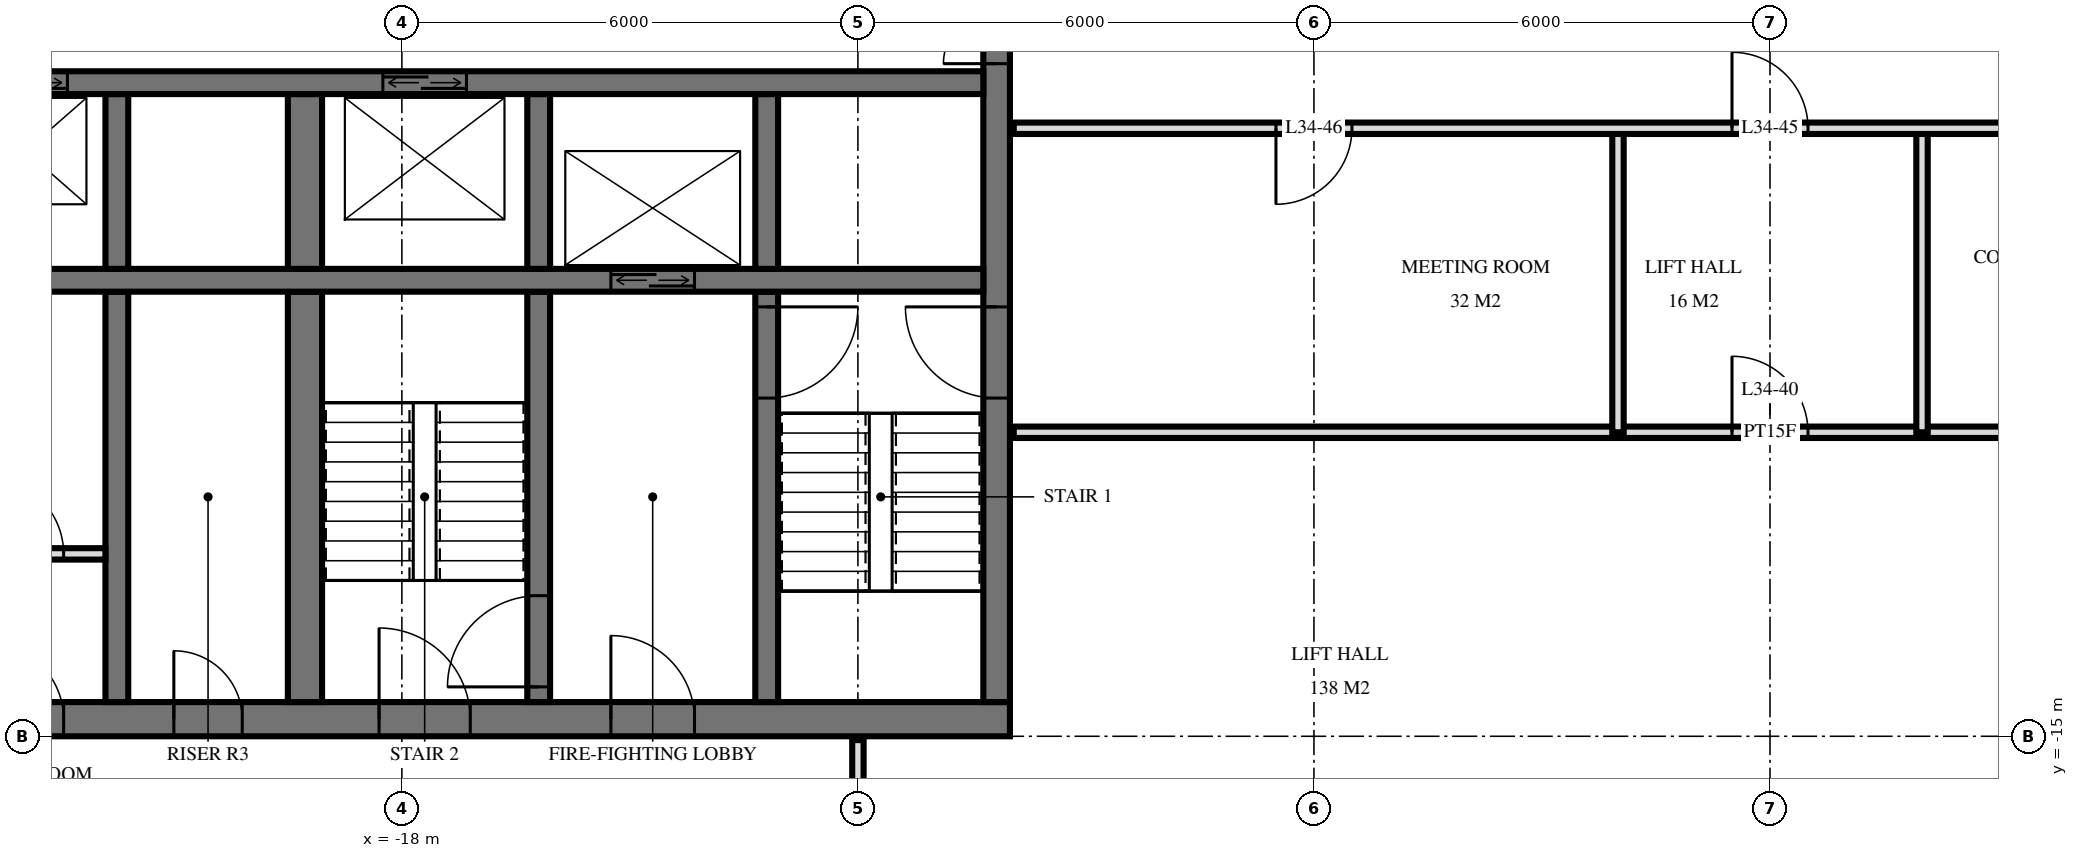
"""IFC4 building model, lengths in metres.
Left out: names, types, materials, properties, quantities, classifications, styles, units other than length and angle.
Written with IfcOpenShell. Run it as: python <this file> out.ifc"""

import sys

from ifc_helpers import new_model, si_unit, direction, frame, frame_2d, origin, place, context, subcontext, project, spatial, rectangle, extrude, element, fill, save


model = new_model("IFC4")
c1 = context("Model", 3, precision=1e-05, world=origin(), true_north=direction((0.0, 1.0)))
c2 = subcontext(c1, "Body", "Model", "MODEL_VIEW")
j1 = project(units=[si_unit("LENGTHUNIT", "METRE"), si_unit("PLANEANGLEUNIT", "RADIAN")], contexts=[c1])
p1 = place(None, origin())
s1 = spatial("IfcSite", under=j1, at=p1, CompositionType="ELEMENT")
p2 = place(p1, origin())
s2 = spatial("IfcBuilding", under=s1, at=p2, CompositionType="ELEMENT")
p3 = place(p2, frame((0.0, 0.0, 134.4)))
s3 = spatial("IfcBuildingStorey", under=s2, at=p3, CompositionType="ELEMENT", Elevation=134.4)
p4 = place(p3, frame((-24.5, -14.775, 0.0), z_axis=(0.0, 0.0, 1.0), x_axis=(1.0, 0.0, 0.0)))
e1 = element("IfcWall", 1, at=p4, inside=s3, PredefinedType="SHEAR", context=c2, shape_type="SweptSolid", body=[
    extrude(rectangle(XDim=14.5, YDim=0.45, at=frame_2d((7.25, 0.0))), origin(), (0.0, 0.0, 1.0), 3.6),
])
p5 = place(p4, frame((6.2, 0.0, 0.0)))
e2 = element("IfcOpeningElement", 2, at=p5, cuts=e1, PredefinedType="OPENING", context=c2, shape_type="SweptSolid", body=[
    extrude(rectangle(XDim=1.2, YDim=2.1, at=frame_2d((0.6, 1.05))), frame((0.0, 0.235, 0.0), z_axis=(0.0, -1.0, 0.0), x_axis=(1.0, 0.0, 0.0)), (0.0, 0.0, 1.0), 0.47),
])
p6 = place(p4, frame((9.25, 0.0, 0.0)))
e3 = element("IfcOpeningElement", 3, at=p6, cuts=e1, PredefinedType="OPENING", context=c2, shape_type="SweptSolid", body=[
    extrude(rectangle(XDim=1.1, YDim=2.1, at=frame_2d((0.55, 1.05))), frame((0.0, 0.235, 0.0), z_axis=(0.0, -1.0, 0.0), x_axis=(1.0, 0.0, 0.0)), (0.0, 0.0, 1.0), 0.47),
])
p7 = place(p4, frame((3.5, 0.0, 0.0)))
e4 = element("IfcOpeningElement", 4, at=p7, cuts=e1, PredefinedType="OPENING", context=c2, shape_type="SweptSolid", body=[
    extrude(rectangle(XDim=0.9, YDim=2.1, at=frame_2d((0.45, 1.05))), frame((0.0, 0.235, 0.0), z_axis=(0.0, -1.0, 0.0), x_axis=(1.0, 0.0, 0.0)), (0.0, 0.0, 1.0), 0.47),
])
p8 = place(p4, frame((1.05, 0.0, 0.0)))
e5 = element("IfcOpeningElement", 5, at=p8, cuts=e1, PredefinedType="OPENING", context=c2, shape_type="SweptSolid", body=[
    extrude(rectangle(XDim=1.0, YDim=2.1, at=frame_2d((0.5, 1.05))), frame((0.0, 0.235, 0.0), z_axis=(0.0, -1.0, 0.0), x_axis=(1.0, 0.0, 0.0)), (0.0, 0.0, 1.0), 0.47),
])
p9 = place(p3, frame((-10.175, -14.55, 0.0), z_axis=(0.0, 0.0, 1.0), x_axis=(0.0, 1.0, 0.0)))
e6 = element("IfcWall", 6, at=p9, inside=s3, PredefinedType="SHEAR", context=c2, shape_type="SweptSolid", body=[
    extrude(rectangle(XDim=14.1, YDim=0.35, at=frame_2d((7.05, 0.0))), origin(), (0.0, 0.0, 1.0), 3.6),
])
p10 = place(p9, frame((8.4, 0.0, 0.0)))
e7 = element("IfcOpeningElement", 7, at=p10, cuts=e6, PredefinedType="OPENING", context=c2, shape_type="SweptSolid", body=[
    extrude(rectangle(XDim=1.4, YDim=2.4, at=frame_2d((0.7, 1.2))), frame((0.0, 0.185, 0.0), z_axis=(0.0, -1.0, 0.0), x_axis=(1.0, 0.0, 0.0)), (0.0, 0.0, 1.0), 0.37),
])
p11 = place(p9, frame((10.0, 0.0, 0.0)))
e8 = element("IfcOpeningElement", 8, at=p11, cuts=e6, PredefinedType="OPENING", context=c2, shape_type="SweptSolid", body=[
    extrude(rectangle(XDim=1.4, YDim=2.4, at=frame_2d((0.7, 1.2))), frame((0.0, 0.185, 0.0), z_axis=(0.0, -1.0, 0.0), x_axis=(1.0, 0.0, 0.0)), (0.0, 0.0, 1.0), 0.37),
])
p12 = place(p9, frame((4.0, 0.0, 0.0)))
e9 = element("IfcOpeningElement", 9, at=p12, cuts=e6, PredefinedType="OPENING", context=c2, shape_type="SweptSolid", body=[
    extrude(rectangle(XDim=1.2, YDim=2.1, at=frame_2d((0.6, 1.05))), frame((0.0, 0.185, 0.0), z_axis=(0.0, -1.0, 0.0), x_axis=(1.0, 0.0, 0.0)), (0.0, 0.0, 1.0), 0.37),
])
p13 = place(p3, frame((-24.05, -6.4, 0.0), z_axis=(0.0, 0.0, 1.0), x_axis=(1.0, 0.0, 0.0)))
e10 = element("IfcWall", 10, at=p13, inside=s3, PredefinedType="SHEAR", context=c2, shape_type="SweptSolid", body=[
    extrude(rectangle(XDim=13.7, YDim=0.3, at=frame_2d((6.85, 0.0))), origin(), (0.0, 0.0, 1.0), 3.6),
])
p14 = place(p13, frame((0.55, 0.0, 0.0)))
e11 = element("IfcOpeningElement", 11, at=p14, cuts=e10, PredefinedType="OPENING", context=c2, shape_type="SweptSolid", body=[
    extrude(rectangle(XDim=1.1, YDim=2.1, at=frame_2d((0.55, 1.05))), frame((0.0, 0.16, 0.0), z_axis=(0.0, -1.0, 0.0), x_axis=(1.0, 0.0, 0.0)), (0.0, 0.0, 1.0), 0.32),
])
p15 = place(p13, frame((5.8, 0.0, 0.0)))
e12 = element("IfcOpeningElement", 12, at=p15, cuts=e10, PredefinedType="OPENING", context=c2, shape_type="SweptSolid", body=[
    extrude(rectangle(XDim=1.1, YDim=2.1, at=frame_2d((0.55, 1.05))), frame((0.0, 0.16, 0.0), z_axis=(0.0, -1.0, 0.0), x_axis=(1.0, 0.0, 0.0)), (0.0, 0.0, 1.0), 0.32),
])
p16 = place(p3, frame((-24.05, -9.0, 0.0), z_axis=(0.0, 0.0, 1.0), x_axis=(1.0, 0.0, 0.0)))
e13 = element("IfcWall", 13, at=p16, inside=s3, PredefinedType="SHEAR", context=c2, shape_type="SweptSolid", body=[
    extrude(rectangle(XDim=13.7, YDim=0.3, at=frame_2d((6.85, 0.0))), origin(), (0.0, 0.0, 1.0), 3.6),
])
p17 = place(p16, frame((8.8, 0.0, 0.0)))
e14 = element("IfcOpeningElement", 14, at=p17, cuts=e13, PredefinedType="OPENING", context=c2, shape_type="SweptSolid", body=[
    extrude(rectangle(XDim=1.1, YDim=2.1, at=frame_2d((0.55, 1.05))), frame((0.0, 0.16, 0.0), z_axis=(0.0, -1.0, 0.0), x_axis=(1.0, 0.0, 0.0)), (0.0, 0.0, 1.0), 0.32),
])
p18 = place(p3, frame((-13.2, -8.85, 0.0), z_axis=(0.0, 0.0, 1.0), x_axis=(0.0, 1.0, 0.0)))
e15 = element("IfcWall", 15, at=p18, inside=s3, PredefinedType="SHEAR", context=c2, shape_type="SweptSolid", body=[
    extrude(rectangle(XDim=2.3, YDim=0.3, at=frame_2d((1.15, 0.0))), origin(), (0.0, 0.0, 1.0), 3.6),
])
p19 = place(p3, frame((-13.2, -14.55, 0.0), z_axis=(0.0, 0.0, 1.0), x_axis=(0.0, 1.0, 0.0)))
e16 = element("IfcWall", 16, at=p19, inside=s3, PredefinedType="SHEAR", context=c2, shape_type="SweptSolid", body=[
    extrude(rectangle(XDim=5.4, YDim=0.3, at=frame_2d((2.7, 0.0))), origin(), (0.0, 0.0, 1.0), 3.6),
])
p20 = place(p19, frame((4.0, 0.0, 0.0)))
e17 = element("IfcOpeningElement", 17, at=p20, cuts=e16, PredefinedType="OPENING", context=c2, shape_type="SweptSolid", body=[
    extrude(rectangle(XDim=1.2, YDim=2.1, at=frame_2d((0.6, 1.05))), frame((0.0, 0.16, 0.0), z_axis=(0.0, -1.0, 0.0), x_axis=(1.0, 0.0, 0.0)), (0.0, 0.0, 1.0), 0.32),
])
p21 = place(p3, frame((-16.2, -8.85, 0.0), z_axis=(0.0, 0.0, 1.0), x_axis=(0.0, 1.0, 0.0)))
e18 = element("IfcWall", 18, at=p21, inside=s3, PredefinedType="SHEAR", context=c2, shape_type="SweptSolid", body=[
    extrude(rectangle(XDim=2.3, YDim=0.3, at=frame_2d((1.15, 0.0))), origin(), (0.0, 0.0, 1.0), 3.6),
])
p22 = place(p3, frame((-16.2, -14.55, 0.0), z_axis=(0.0, 0.0, 1.0), x_axis=(0.0, 1.0, 0.0)))
e19 = element("IfcWall", 19, at=p22, inside=s3, PredefinedType="SHEAR", context=c2, shape_type="SweptSolid", body=[
    extrude(rectangle(XDim=5.4, YDim=0.3, at=frame_2d((2.7, 0.0))), origin(), (0.0, 0.0, 1.0), 3.6),
])
p23 = place(p22, frame((0.2, 0.0, 0.0)))
e20 = element("IfcOpeningElement", 20, at=p23, cuts=e19, PredefinedType="OPENING", context=c2, shape_type="SweptSolid", body=[
    extrude(rectangle(XDim=1.2, YDim=2.1, at=frame_2d((0.6, 1.05))), frame((0.0, 0.16, 0.0), z_axis=(0.0, -1.0, 0.0), x_axis=(1.0, 0.0, 0.0)), (0.0, 0.0, 1.0), 0.32),
])
p24 = place(p3, frame((-19.275, -8.85, 0.0), z_axis=(0.0, 0.0, 1.0), x_axis=(0.0, 1.0, 0.0)))
e21 = element("IfcWall", 21, at=p24, inside=s3, PredefinedType="SHEAR", context=c2, shape_type="SweptSolid", body=[
    extrude(rectangle(XDim=2.3, YDim=0.45, at=frame_2d((1.15, 0.0))), origin(), (0.0, 0.0, 1.0), 3.6),
])
p25 = place(p3, frame((-19.275, -14.55, 0.0), z_axis=(0.0, 0.0, 1.0), x_axis=(0.0, 1.0, 0.0)))
e22 = element("IfcWall", 22, at=p25, inside=s3, PredefinedType="SHEAR", context=c2, shape_type="SweptSolid", body=[
    extrude(rectangle(XDim=5.4, YDim=0.45, at=frame_2d((2.7, 0.0))), origin(), (0.0, 0.0, 1.0), 3.6),
])
p26 = place(p3, frame((-21.75, -8.85, 0.0), z_axis=(0.0, 0.0, 1.0), x_axis=(0.0, 1.0, 0.0)))
e23 = element("IfcWall", 23, at=p26, inside=s3, PredefinedType="SHEAR", context=c2, shape_type="SweptSolid", body=[
    extrude(rectangle(XDim=2.3, YDim=0.3, at=frame_2d((1.15, 0.0))), origin(), (0.0, 0.0, 1.0), 3.6),
])
p27 = place(p3, frame((-21.75, -14.55, 0.0), z_axis=(0.0, 0.0, 1.0), x_axis=(0.0, 1.0, 0.0)))
e24 = element("IfcWall", 24, at=p27, inside=s3, PredefinedType="SHEAR", context=c2, shape_type="SweptSolid", body=[
    extrude(rectangle(XDim=5.4, YDim=0.3, at=frame_2d((2.7, 0.0))), origin(), (0.0, 0.0, 1.0), 3.6),
])
p28 = place(p3, frame((-24.0, -12.6, 0.0), z_axis=(0.0, 0.0, 1.0), x_axis=(1.0, 0.0, 0.0)))
e25 = element("IfcWall", 25, at=p28, inside=s3, PredefinedType="PARTITIONING", context=c2, shape_type="SweptSolid", body=[
    extrude(rectangle(XDim=2.1, YDim=0.15, at=frame_2d((1.05, 0.0))), origin(), (0.0, 0.0, 1.0), 3.3),
])
p29 = place(p28, frame((0.55, 0.0, 0.0)))
e26 = element("IfcOpeningElement", 26, at=p29, cuts=e25, PredefinedType="OPENING", context=c2, shape_type="SweptSolid", body=[
    extrude(rectangle(XDim=1.0, YDim=2.1, at=frame_2d((0.5, 1.05))), frame((0.0, 0.085, 0.0), z_axis=(0.0, -1.0, 0.0), x_axis=(1.0, 0.0, 0.0)), (0.0, 0.0, 1.0), 0.17),
])
for number, where, z_axis, x_axis in (
    (27, (2.0, -11.0, 0.0), (0.0, 0.0, 1.0), (0.0, 1.0, 0.0)),
    (28, (-2.0, -11.0, 0.0), (0.0, 0.0, 1.0), (0.0, 1.0, 0.0)),
):
    element("IfcWall", number, at=place(p3, frame(where, z_axis=z_axis, x_axis=x_axis)), inside=s3, PredefinedType="PARTITIONING", context=c2, shape_type="SweptSolid", body=[
        extrude(rectangle(XDim=4.0, YDim=0.15, at=frame_2d((2.0, 0.0))), origin(), (0.0, 0.0, 1.0), 3.32),
    ])
p30 = place(p3, frame((-12.0, -17.4, 0.0), z_axis=(0.0, 0.0, 1.0), x_axis=(0.0, 1.0, 0.0)))
e29 = element("IfcWall", 29, at=p30, inside=s3, PredefinedType="PARTITIONING", context=c2, shape_type="SweptSolid", body=[
    extrude(rectangle(XDim=2.35, YDim=0.15, at=frame_2d((1.175, 0.0))), origin(), (0.0, 0.0, 1.0), 3.32),
])
p31 = place(p30, frame((0.7, 0.0, 0.0)))
e30 = element("IfcOpeningElement", 30, at=p31, cuts=e29, PredefinedType="OPENING", context=c2, shape_type="SweptSolid", body=[
    extrude(rectangle(XDim=1.0, YDim=2.1, at=frame_2d((0.5, 1.05))), frame((0.0, 0.085, 0.0), z_axis=(0.0, -1.0, 0.0), x_axis=(1.0, 0.0, 0.0)), (0.0, 0.0, 1.0), 0.17),
])
p32 = place(p3, frame((-9.95, -11.0, 0.0), z_axis=(0.0, 0.0, 1.0), x_axis=(1.0, 0.0, 0.0)))
e31 = element("IfcWall", 31, at=p32, inside=s3, PredefinedType="PARTITIONING", context=c2, shape_type="SweptSolid", body=[
    extrude(rectangle(XDim=19.9, YDim=0.15, at=frame_2d((9.95, 0.0))), origin(), (0.0, 0.0, 1.0), 3.32),
])
p33 = place(p32, frame((9.45, 0.0, 0.0)))
e32 = element("IfcOpeningElement", 32, at=p33, cuts=e31, PredefinedType="OPENING", context=c2, shape_type="SweptSolid", body=[
    extrude(rectangle(XDim=1.0, YDim=2.1, at=frame_2d((0.5, 1.05))), frame((0.0, 0.085, 0.0), z_axis=(0.0, -1.0, 0.0), x_axis=(1.0, 0.0, 0.0)), (0.0, 0.0, 1.0), 0.17),
])
p34 = place(p32, frame((15.45, 0.0, 0.0)))
e33 = element("IfcOpeningElement", 33, at=p34, cuts=e31, PredefinedType="OPENING", context=c2, shape_type="SweptSolid", body=[
    extrude(rectangle(XDim=1.0, YDim=2.1, at=frame_2d((0.5, 1.05))), frame((0.0, 0.085, 0.0), z_axis=(0.0, -1.0, 0.0), x_axis=(1.0, 0.0, 0.0)), (0.0, 0.0, 1.0), 0.17),
])
p35 = place(p3, frame((-9.95, -7.0, 0.0), z_axis=(0.0, 0.0, 1.0), x_axis=(1.0, 0.0, 0.0)))
e34 = element("IfcWall", 34, at=p35, inside=s3, PredefinedType="PARTITIONING", context=c2, shape_type="SweptSolid", body=[
    extrude(rectangle(XDim=19.9, YDim=0.15, at=frame_2d((9.95, 0.0))), origin(), (0.0, 0.0, 1.0), 3.32),
])
p36 = place(p35, frame((9.45, 0.0, 0.0)))
e35 = element("IfcOpeningElement", 35, at=p36, cuts=e34, PredefinedType="OPENING", context=c2, shape_type="SweptSolid", body=[
    extrude(rectangle(XDim=1.0, YDim=2.1, at=frame_2d((0.5, 1.05))), frame((0.0, 0.085, 0.0), z_axis=(0.0, -1.0, 0.0), x_axis=(1.0, 0.0, 0.0)), (0.0, 0.0, 1.0), 0.17),
])
p37 = place(p35, frame((3.45, 0.0, 0.0)))
e36 = element("IfcOpeningElement", 36, at=p37, cuts=e34, PredefinedType="OPENING", context=c2, shape_type="SweptSolid", body=[
    extrude(rectangle(XDim=1.0, YDim=2.1, at=frame_2d((0.5, 1.05))), frame((0.0, 0.085, 0.0), z_axis=(0.0, -1.0, 0.0), x_axis=(1.0, 0.0, 0.0)), (0.0, 0.0, 1.0), 0.17),
])
p38 = place(p14, origin())
e37 = element("IfcDoor", 37, at=p38, inside=s3, OperationType="DOUBLE_DOOR_SLIDING", PredefinedType="USERDEFINED", context=c2, shape_type="SweptSolid", body=[
    extrude(rectangle(XDim=1.1, YDim=2.1, at=frame_2d((0.55, 1.05))), frame((0.0, 0.025, 0.0), z_axis=(0.0, -1.0, 0.0), x_axis=(1.0, 0.0, 0.0)), (0.0, 0.0, 1.0), 0.05),
])
fill(e11, e37)
p39 = place(p17, origin())
e38 = element("IfcDoor", 38, at=p39, inside=s3, OperationType="DOUBLE_DOOR_SLIDING", PredefinedType="USERDEFINED", context=c2, shape_type="SweptSolid", body=[
    extrude(rectangle(XDim=1.1, YDim=2.1, at=frame_2d((0.55, 1.05))), frame((0.0, 0.025, 0.0), z_axis=(0.0, -1.0, 0.0), x_axis=(1.0, 0.0, 0.0)), (0.0, 0.0, 1.0), 0.05),
])
fill(e14, e38)
p40 = place(p15, origin())
e39 = element("IfcDoor", 39, at=p40, inside=s3, OperationType="DOUBLE_DOOR_SLIDING", PredefinedType="USERDEFINED", context=c2, shape_type="SweptSolid", body=[
    extrude(rectangle(XDim=1.1, YDim=2.1, at=frame_2d((0.55, 1.05))), frame((0.0, 0.025, 0.0), z_axis=(0.0, -1.0, 0.0), x_axis=(1.0, 0.0, 0.0)), (0.0, 0.0, 1.0), 0.05),
])
fill(e12, e39)
p41 = place(p10, origin())
e40 = element("IfcDoor", 40, at=p41, inside=s3, OperationType="DOUBLE_DOOR_SINGLE_SWING", PredefinedType="DOOR", context=c2, shape_type="SweptSolid", body=[
    extrude(rectangle(XDim=1.4, YDim=2.4, at=frame_2d((0.7, 1.2))), frame((0.0, 0.025, 0.0), z_axis=(0.0, -1.0, 0.0), x_axis=(1.0, 0.0, 0.0)), (0.0, 0.0, 1.0), 0.05),
])
fill(e7, e40)
p42 = place(p12, origin())
e41 = element("IfcDoor", 41, at=p42, inside=s3, OperationType="SINGLE_SWING_LEFT", PredefinedType="DOOR", context=c2, shape_type="SweptSolid", body=[
    extrude(rectangle(XDim=1.2, YDim=2.1, at=frame_2d((0.6, 1.05))), frame((0.0, 0.025, 0.0), z_axis=(0.0, -1.0, 0.0), x_axis=(1.0, 0.0, 0.0)), (0.0, 0.0, 1.0), 0.05),
])
fill(e9, e41)
p43 = place(p5, origin())
e42 = element("IfcDoor", 42, at=p43, inside=s3, OperationType="SINGLE_SWING_RIGHT", PredefinedType="DOOR", context=c2, shape_type="SweptSolid", body=[
    extrude(rectangle(XDim=1.2, YDim=2.1, at=frame_2d((0.6, 1.05))), frame((0.0, 0.025, 0.0), z_axis=(0.0, -1.0, 0.0), x_axis=(1.0, 0.0, 0.0)), (0.0, 0.0, 1.0), 0.05),
])
fill(e2, e42)
p44 = place(p6, origin())
e43 = element("IfcDoor", 43, at=p44, inside=s3, OperationType="SINGLE_SWING_RIGHT", PredefinedType="DOOR", context=c2, shape_type="SweptSolid", body=[
    extrude(rectangle(XDim=1.1, YDim=2.1, at=frame_2d((0.55, 1.05))), frame((0.0, 0.025, 0.0), z_axis=(0.0, -1.0, 0.0), x_axis=(1.0, 0.0, 0.0)), (0.0, 0.0, 1.0), 0.05),
])
fill(e3, e43)
p45 = place(p7, origin())
e44 = element("IfcDoor", 44, at=p45, inside=s3, OperationType="SINGLE_SWING_RIGHT", PredefinedType="DOOR", context=c2, shape_type="SweptSolid", body=[
    extrude(rectangle(XDim=0.9, YDim=2.1, at=frame_2d((0.45, 1.05))), frame((0.0, 0.025, 0.0), z_axis=(0.0, -1.0, 0.0), x_axis=(1.0, 0.0, 0.0)), (0.0, 0.0, 1.0), 0.05),
])
fill(e4, e44)
p46 = place(p8, origin())
e45 = element("IfcDoor", 45, at=p46, inside=s3, OperationType="SINGLE_SWING_RIGHT", PredefinedType="DOOR", context=c2, shape_type="SweptSolid", body=[
    extrude(rectangle(XDim=1.0, YDim=2.1, at=frame_2d((0.5, 1.05))), frame((0.0, 0.025, 0.0), z_axis=(0.0, -1.0, 0.0), x_axis=(1.0, 0.0, 0.0)), (0.0, 0.0, 1.0), 0.05),
])
fill(e5, e45)
p47 = place(p20, frame((0.6, 0.0, 0.0), z_axis=(0.0, 0.0, 1.0), x_axis=(-1.0, 0.0, 0.0)))
e46 = element("IfcDoor", 46, at=p47, inside=s3, OperationType="SINGLE_SWING_RIGHT", PredefinedType="DOOR", context=c2, shape_type="SweptSolid", body=[
    extrude(rectangle(XDim=1.2, YDim=2.1, at=frame_2d((0.0, 1.05))), frame((0.0, -0.025, 0.0), z_axis=(0.0, 1.0, 0.0), x_axis=(-1.0, 0.0, 0.0)), (0.0, 0.0, 1.0), 0.05),
])
fill(e17, e46)
p48 = place(p23, origin())
e47 = element("IfcDoor", 47, at=p48, inside=s3, OperationType="SINGLE_SWING_RIGHT", PredefinedType="DOOR", context=c2, shape_type="SweptSolid", body=[
    extrude(rectangle(XDim=1.2, YDim=2.1, at=frame_2d((0.6, 1.05))), frame((0.0, 0.025, 0.0), z_axis=(0.0, -1.0, 0.0), x_axis=(1.0, 0.0, 0.0)), (0.0, 0.0, 1.0), 0.05),
])
fill(e20, e47)
p49 = place(p29, origin())
e48 = element("IfcDoor", 48, at=p49, inside=s3, OperationType="SINGLE_SWING_RIGHT", PredefinedType="DOOR", context=c2, shape_type="SweptSolid", body=[
    extrude(rectangle(XDim=1.0, YDim=2.1, at=frame_2d((0.5, 1.05))), frame((0.0, 0.025, 0.0), z_axis=(0.0, -1.0, 0.0), x_axis=(1.0, 0.0, 0.0)), (0.0, 0.0, 1.0), 0.05),
])
fill(e26, e48)
p50 = place(p33, origin())
e49 = element("IfcDoor", 49, at=p50, inside=s3, OperationType="SINGLE_SWING_RIGHT", PredefinedType="DOOR", context=c2, shape_type="SweptSolid", body=[
    extrude(rectangle(XDim=1.0, YDim=2.1, at=frame_2d((0.5, 1.05))), frame((0.0, 0.025, 0.0), z_axis=(0.0, -1.0, 0.0), x_axis=(1.0, 0.0, 0.0)), (0.0, 0.0, 1.0), 0.05),
])
fill(e32, e49)
p51 = place(p36, origin())
e50 = element("IfcDoor", 50, at=p51, inside=s3, OperationType="SINGLE_SWING_RIGHT", PredefinedType="DOOR", context=c2, shape_type="SweptSolid", body=[
    extrude(rectangle(XDim=1.0, YDim=2.1, at=frame_2d((0.5, 1.05))), frame((0.0, 0.025, 0.0), z_axis=(0.0, -1.0, 0.0), x_axis=(1.0, 0.0, 0.0)), (0.0, 0.0, 1.0), 0.05),
])
fill(e35, e50)
p52 = place(p37, frame((0.5, 0.0, 0.0), z_axis=(0.0, 0.0, 1.0), x_axis=(-1.0, 0.0, 0.0)))
e51 = element("IfcDoor", 51, at=p52, inside=s3, OperationType="SINGLE_SWING_LEFT", PredefinedType="DOOR", context=c2, shape_type="SweptSolid", body=[
    extrude(rectangle(XDim=1.0, YDim=2.1, at=frame_2d((0.0, 1.05))), frame((0.0, -0.025, 0.0), z_axis=(0.0, 1.0, 0.0), x_axis=(-1.0, 0.0, 0.0)), (0.0, 0.0, 1.0), 0.05),
])
fill(e36, e51)
save(model, sys.argv[1])
